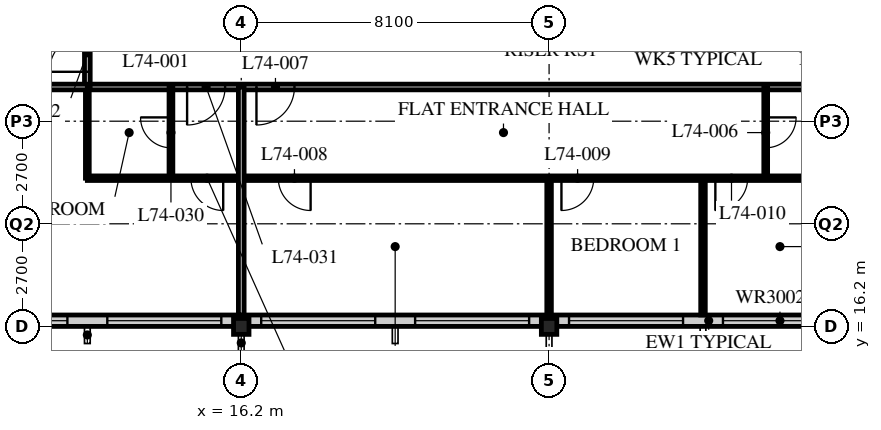
"""IFC4 building model, lengths in metres.
Left out: names, types, materials, properties, quantities, classifications, styles, units other than length and angle.
Written with IfcOpenShell. Run it as: python <this file> out.ifc"""

import sys

from ifc_helpers import new_model, si_unit, direction, frame, frame_2d, origin, origin_2d, place, context, subcontext, project, spatial, rectangle, i_section, extrude, element, fill, save


model = new_model("IFC4")
c1 = context("Model", 3, precision=1e-05, world=origin(), true_north=direction((0.0, 1.0)))
c2 = subcontext(c1, "Body", "Model", "MODEL_VIEW")
j1 = project(units=[si_unit("LENGTHUNIT", "METRE"), si_unit("PLANEANGLEUNIT", "RADIAN")], contexts=[c1])
p1 = place(None, origin())
s1 = spatial("IfcSite", under=j1, at=p1, CompositionType="ELEMENT")
p2 = place(p1, origin())
s2 = spatial("IfcBuilding", under=s1, at=p2, CompositionType="ELEMENT")
p3 = place(p2, frame((0.0, 0.0, 289.2)))
s3 = spatial("IfcBuildingStorey", under=s2, at=p3, CompositionType="ELEMENT", Elevation=289.2)
for number, where, z_axis, x_axis in (
    (1, (16.2, 16.2, 0.0), (0.0, 0.0, 1.0), (1.0, 0.0, 0.0)),
    (2, (24.3, 16.2, 0.0), (0.0, 0.0, 1.0), (1.0, 0.0, 0.0)),
):
    element("IfcColumn", number, at=place(p3, frame(where, z_axis=z_axis, x_axis=x_axis)), inside=s3, PredefinedType="COLUMN", context=c2, shape_type="SweptSolid", body=[
        extrude(i_section(OverallWidth=0.407, OverallDepth=0.419, WebThickness=0.031, FlangeThickness=0.049, FilletRadius=0.015, at=origin_2d()), origin(), (0.0, 0.0, 1.0), 3.9),
    ])
p4 = place(p3, frame((8.4, 16.35, 0.0), z_axis=(0.0, 0.0, 1.0), x_axis=(1.0, 0.0, 0.0)))
e3 = element("IfcWall", 3, at=p4, inside=s3, PredefinedType="SOLIDWALL", context=c2, shape_type="SweptSolid", body=[
    extrude(rectangle(XDim=40.2, YDim=0.3, at=frame_2d((20.1, 0.0))), origin(), (0.0, 0.0, 1.0), 3.69),
])
p5 = place(p4, frame((0.225, 0.0, 0.6)))
e4 = element("IfcOpeningElement", 4, at=p5, cuts=e3, PredefinedType="OPENING", context=c2, shape_type="SweptSolid", body=[
    extrude(rectangle(XDim=3.0, YDim=2.4, at=frame_2d((1.5, 1.2))), frame((0.0, 0.16, 0.0), z_axis=(0.0, -1.0, 0.0), x_axis=(1.0, 0.0, 0.0)), (0.0, 0.0, 1.0), 0.32),
])
p6 = place(p4, frame((4.275, 0.0, 0.6)))
e5 = element("IfcOpeningElement", 5, at=p6, cuts=e3, PredefinedType="OPENING", context=c2, shape_type="SweptSolid", body=[
    extrude(rectangle(XDim=3.0, YDim=2.4, at=frame_2d((1.5, 1.2))), frame((0.0, 0.16, 0.0), z_axis=(0.0, -1.0, 0.0), x_axis=(1.0, 0.0, 0.0)), (0.0, 0.0, 1.0), 0.32),
])
p7 = place(p4, frame((8.325, 0.0, 0.6)))
e6 = element("IfcOpeningElement", 6, at=p7, cuts=e3, PredefinedType="OPENING", context=c2, shape_type="SweptSolid", body=[
    extrude(rectangle(XDim=3.0, YDim=2.4, at=frame_2d((1.5, 1.2))), frame((0.0, 0.16, 0.0), z_axis=(0.0, -1.0, 0.0), x_axis=(1.0, 0.0, 0.0)), (0.0, 0.0, 1.0), 0.32),
])
p8 = place(p4, frame((12.375, 0.0, 0.6)))
e7 = element("IfcOpeningElement", 7, at=p8, cuts=e3, PredefinedType="OPENING", context=c2, shape_type="SweptSolid", body=[
    extrude(rectangle(XDim=3.0, YDim=2.4, at=frame_2d((1.5, 1.2))), frame((0.0, 0.16, 0.0), z_axis=(0.0, -1.0, 0.0), x_axis=(1.0, 0.0, 0.0)), (0.0, 0.0, 1.0), 0.32),
])
p9 = place(p4, frame((16.425, 0.0, 0.6)))
e8 = element("IfcOpeningElement", 8, at=p9, cuts=e3, PredefinedType="OPENING", context=c2, shape_type="SweptSolid", body=[
    extrude(rectangle(XDim=3.0, YDim=2.4, at=frame_2d((1.5, 1.2))), frame((0.0, 0.16, 0.0), z_axis=(0.0, -1.0, 0.0), x_axis=(1.0, 0.0, 0.0)), (0.0, 0.0, 1.0), 0.32),
])
p10 = place(p4, frame((20.475, 0.0, 0.6)))
e9 = element("IfcOpeningElement", 9, at=p10, cuts=e3, PredefinedType="OPENING", context=c2, shape_type="SweptSolid", body=[
    extrude(rectangle(XDim=3.0, YDim=2.4, at=frame_2d((1.5, 1.2))), frame((0.0, 0.16, 0.0), z_axis=(0.0, -1.0, 0.0), x_axis=(1.0, 0.0, 0.0)), (0.0, 0.0, 1.0), 0.32),
])
p11 = place(p4, frame((24.525, 0.0, 0.6)))
e10 = element("IfcOpeningElement", 10, at=p11, cuts=e3, PredefinedType="OPENING", context=c2, shape_type="SweptSolid", body=[
    extrude(rectangle(XDim=3.0, YDim=2.4, at=frame_2d((1.5, 1.2))), frame((0.0, 0.16, 0.0), z_axis=(0.0, -1.0, 0.0), x_axis=(1.0, 0.0, 0.0)), (0.0, 0.0, 1.0), 0.32),
])
p12 = place(p4, frame((28.575, 0.0, 0.6)))
e11 = element("IfcOpeningElement", 11, at=p12, cuts=e3, PredefinedType="OPENING", context=c2, shape_type="SweptSolid", body=[
    extrude(rectangle(XDim=3.0, YDim=2.4, at=frame_2d((1.5, 1.2))), frame((0.0, 0.16, 0.0), z_axis=(0.0, -1.0, 0.0), x_axis=(1.0, 0.0, 0.0)), (0.0, 0.0, 1.0), 0.32),
])
p13 = place(p4, frame((32.625, 0.0, 0.6)))
e12 = element("IfcOpeningElement", 12, at=p13, cuts=e3, PredefinedType="OPENING", context=c2, shape_type="SweptSolid", body=[
    extrude(rectangle(XDim=3.0, YDim=2.4, at=frame_2d((1.5, 1.2))), frame((0.0, 0.16, 0.0), z_axis=(0.0, -1.0, 0.0), x_axis=(1.0, 0.0, 0.0)), (0.0, 0.0, 1.0), 0.32),
])
p14 = place(p4, frame((36.675, 0.0, 0.6)))
e13 = element("IfcOpeningElement", 13, at=p14, cuts=e3, PredefinedType="OPENING", context=c2, shape_type="SweptSolid", body=[
    extrude(rectangle(XDim=3.0, YDim=2.4, at=frame_2d((1.5, 1.2))), frame((0.0, 0.16, 0.0), z_axis=(0.0, -1.0, 0.0), x_axis=(1.0, 0.0, 0.0)), (0.0, 0.0, 1.0), 0.32),
])
p15 = place(p3, frame((12.15, 22.5, 0.0), z_axis=(0.0, 0.0, 1.0), x_axis=(1.0, 0.0, 0.0)))
e14 = element("IfcWall", 14, at=p15, inside=s3, PredefinedType="PARTITIONING", context=c2, shape_type="SweptSolid", body=[
    extrude(rectangle(XDim=24.3, YDim=0.15, at=frame_2d((12.15, 0.0))), origin(), (0.0, 0.0, 1.0), 3.69),
])
p16 = place(p15, frame((4.45, 0.0, 0.0)))
e15 = element("IfcOpeningElement", 15, at=p16, cuts=e14, PredefinedType="OPENING", context=c2, shape_type="SweptSolid", body=[
    extrude(rectangle(XDim=1.0, YDim=2.1, at=frame_2d((0.5, 1.05))), frame((0.0, 0.085, 0.0), z_axis=(0.0, -1.0, 0.0), x_axis=(1.0, 0.0, 0.0)), (0.0, 0.0, 1.0), 0.17),
])
p17 = place(p15, frame((22.6, 0.0, 0.0)))
e16 = element("IfcOpeningElement", 16, at=p17, cuts=e14, PredefinedType="OPENING", context=c2, shape_type="SweptSolid", body=[
    extrude(rectangle(XDim=1.0, YDim=2.1, at=frame_2d((0.5, 1.05))), frame((0.0, 0.085, 0.0), z_axis=(0.0, -1.0, 0.0), x_axis=(1.0, 0.0, 0.0)), (0.0, 0.0, 1.0), 0.17),
])
p18 = place(p15, frame((2.625, 0.0, 0.0)))
e17 = element("IfcOpeningElement", 17, at=p18, cuts=e14, PredefinedType="OPENING", context=c2, shape_type="SweptSolid", body=[
    extrude(rectangle(XDim=1.0, YDim=2.1, at=frame_2d((0.5, 1.05))), frame((0.0, 0.085, 0.0), z_axis=(0.0, -1.0, 0.0), x_axis=(1.0, 0.0, 0.0)), (0.0, 0.0, 1.0), 0.17),
])
p19 = place(p3, frame((12.15, 22.5, 0.0), z_axis=(0.0, 0.0, 1.0), x_axis=(0.0, 1.0, 0.0)))
e18 = element("IfcWall", 18, at=p19, inside=s3, PredefinedType="PARTITIONING", context=c2, shape_type="SweptSolid", body=[
    extrude(rectangle(XDim=26.1, YDim=0.15, at=frame_2d((13.05, 0.0))), origin(), (0.0, 0.0, 1.0), 3.69),
])
p20 = place(p19, frame((0.4, 0.0, 0.0)))
e19 = element("IfcOpeningElement", 19, at=p20, cuts=e18, PredefinedType="OPENING", context=c2, shape_type="SweptSolid", body=[
    extrude(rectangle(XDim=1.0, YDim=2.1, at=frame_2d((0.5, 1.05))), frame((0.0, 0.085, 0.0), z_axis=(0.0, -1.0, 0.0), x_axis=(1.0, 0.0, 0.0)), (0.0, 0.0, 1.0), 0.17),
])
p21 = place(p3, frame((30.0, 22.5, 0.0), z_axis=(0.0, 0.0, 1.0), x_axis=(0.0, -1.0, 0.0)))
e20 = element("IfcWall", 20, at=p21, inside=s3, PredefinedType="PARTITIONING", context=c2, shape_type="SweptSolid", body=[
    extrude(rectangle(XDim=2.4, YDim=0.1, at=frame_2d((1.2, 0.0))), origin(), (0.0, 0.0, 1.0), 3.69),
])
p22 = place(p21, frame((0.8, 0.0, 0.0)))
e21 = element("IfcOpeningElement", 21, at=p22, cuts=e20, PredefinedType="OPENING", context=c2, shape_type="SweptSolid", body=[
    extrude(rectangle(XDim=0.8, YDim=2.1, at=frame_2d((0.4, 1.05))), frame((0.0, 0.06, 0.0), z_axis=(0.0, -1.0, 0.0), x_axis=(1.0, 0.0, 0.0)), (0.0, 0.0, 1.0), 0.12),
])
p23 = place(p3, frame((24.3, 20.1, 0.0), z_axis=(0.0, 0.0, 1.0), x_axis=(0.0, -1.0, 0.0)))
e22 = element("IfcWall", 22, at=p23, inside=s3, PredefinedType="PARTITIONING", context=c2, shape_type="SweptSolid", body=[
    extrude(rectangle(XDim=3.6, YDim=0.12, at=frame_2d((1.8, 0.0))), origin(), (0.0, 0.0, 1.0), 3.078),
])
p24 = place(p3, frame((28.35, 20.1, 0.0), z_axis=(0.0, 0.0, 1.0), x_axis=(0.0, -1.0, 0.0)))
e23 = element("IfcWall", 23, at=p24, inside=s3, PredefinedType="PARTITIONING", context=c2, shape_type="SweptSolid", body=[
    extrude(rectangle(XDim=3.6, YDim=0.12, at=frame_2d((1.8, 0.0))), origin(), (0.0, 0.0, 1.0), 3.69),
])
p25 = place(p3, frame((12.15, 20.1, 0.0), z_axis=(0.0, 0.0, 1.0), x_axis=(1.0, 0.0, 0.0)))
e24 = element("IfcWall", 24, at=p25, inside=s3, PredefinedType="PARTITIONING", context=c2, shape_type="SweptSolid", body=[
    extrude(rectangle(XDim=20.25, YDim=0.12, at=frame_2d((10.125, 0.0))), origin(), (0.0, 0.0, 1.0), 3.69),
])
p26 = place(p25, frame((5.025, 0.0, 0.0)))
e25 = element("IfcOpeningElement", 25, at=p26, cuts=e24, PredefinedType="OPENING", context=c2, shape_type="SweptSolid", body=[
    extrude(rectangle(XDim=0.85, YDim=2.1, at=frame_2d((0.425, 1.05))), frame((0.0, 0.07, 0.0), z_axis=(0.0, -1.0, 0.0), x_axis=(1.0, 0.0, 0.0)), (0.0, 0.0, 1.0), 0.14),
])
p27 = place(p25, frame((12.475, 0.0, 0.0)))
e26 = element("IfcOpeningElement", 26, at=p27, cuts=e24, PredefinedType="OPENING", context=c2, shape_type="SweptSolid", body=[
    extrude(rectangle(XDim=0.85, YDim=2.1, at=frame_2d((0.425, 1.05))), frame((0.0, 0.07, 0.0), z_axis=(0.0, -1.0, 0.0), x_axis=(1.0, 0.0, 0.0)), (0.0, 0.0, 1.0), 0.14),
])
p28 = place(p25, frame((16.525, 0.0, 0.0)))
e27 = element("IfcOpeningElement", 27, at=p28, cuts=e24, PredefinedType="OPENING", context=c2, shape_type="SweptSolid", body=[
    extrude(rectangle(XDim=0.85, YDim=2.1, at=frame_2d((0.425, 1.05))), frame((0.0, 0.07, 0.0), z_axis=(0.0, -1.0, 0.0), x_axis=(1.0, 0.0, 0.0)), (0.0, 0.0, 1.0), 0.14),
])
p29 = place(p25, frame((2.725, 0.0, 0.0)))
e28 = element("IfcOpeningElement", 28, at=p29, cuts=e24, PredefinedType="OPENING", context=c2, shape_type="SweptSolid", body=[
    extrude(rectangle(XDim=0.85, YDim=2.1, at=frame_2d((0.425, 1.05))), frame((0.0, 0.07, 0.0), z_axis=(0.0, -1.0, 0.0), x_axis=(1.0, 0.0, 0.0)), (0.0, 0.0, 1.0), 0.14),
])
p30 = place(p3, frame((14.35, 22.5, 0.0), z_axis=(0.0, 0.0, 1.0), x_axis=(0.0, -1.0, 0.0)))
e29 = element("IfcWall", 29, at=p30, inside=s3, PredefinedType="PARTITIONING", context=c2, shape_type="SweptSolid", body=[
    extrude(rectangle(XDim=2.4, YDim=0.1, at=frame_2d((1.2, 0.0))), origin(), (0.0, 0.0, 1.0), 3.69),
])
p31 = place(p30, frame((0.8, 0.0, 0.0)))
e30 = element("IfcOpeningElement", 30, at=p31, cuts=e29, PredefinedType="OPENING", context=c2, shape_type="SweptSolid", body=[
    extrude(rectangle(XDim=0.8, YDim=2.1, at=frame_2d((0.4, 1.05))), frame((0.0, 0.06, 0.0), z_axis=(0.0, -1.0, 0.0), x_axis=(1.0, 0.0, 0.0)), (0.0, 0.0, 1.0), 0.12),
])
p32 = place(p3, frame((12.15, 22.5, 0.0), z_axis=(0.0, 0.0, 1.0), x_axis=(0.0, -1.0, 0.0)))
e31 = element("IfcWall", 31, at=p32, inside=s3, PredefinedType="PARTITIONING", context=c2, shape_type="SweptSolid", body=[
    extrude(rectangle(XDim=2.4, YDim=0.1, at=frame_2d((1.2, 0.0))), origin(), (0.0, 0.0, 1.0), 3.69),
])
p33 = place(p3, frame((4.35, 22.5, 0.0), z_axis=(0.0, 0.0, 1.0), x_axis=(1.0, 0.0, 0.0)))
e32 = element("IfcWall", 32, at=p33, inside=s3, PredefinedType="PARTITIONING", context=c2, shape_type="SweptSolid", body=[
    extrude(rectangle(XDim=7.8, YDim=0.15, at=frame_2d((3.9, 0.0))), origin(), (0.0, 0.0, 1.0), 3.69),
])
p34 = place(p3, frame((16.2, 22.5, 0.0), z_axis=(0.0, 0.0, 1.0), x_axis=(0.0, -1.0, 0.0)))
e33 = element("IfcWall", 33, at=p34, inside=s3, PredefinedType="PARTITIONING", context=c2, shape_type="SweptSolid", body=[
    extrude(rectangle(XDim=6.0, YDim=0.15, at=frame_2d((3.0, 0.0))), origin(), (0.0, 0.0, 1.0), 3.078),
])
p35 = place(p5, origin())
e34 = element("IfcWindow", 34, at=p35, inside=s3, PartitioningType="SINGLE_PANEL", PredefinedType="WINDOW", context=c2, shape_type="SweptSolid", body=[
    extrude(rectangle(XDim=3.0, YDim=2.4, at=frame_2d((1.5, 1.2))), frame((0.0, 0.03, 0.0), z_axis=(0.0, -1.0, 0.0), x_axis=(1.0, 0.0, 0.0)), (0.0, 0.0, 1.0), 0.06),
])
fill(e4, e34)
p36 = place(p6, origin())
e35 = element("IfcWindow", 35, at=p36, inside=s3, PartitioningType="SINGLE_PANEL", PredefinedType="WINDOW", context=c2, shape_type="SweptSolid", body=[
    extrude(rectangle(XDim=3.0, YDim=2.4, at=frame_2d((1.5, 1.2))), frame((0.0, 0.03, 0.0), z_axis=(0.0, -1.0, 0.0), x_axis=(1.0, 0.0, 0.0)), (0.0, 0.0, 1.0), 0.06),
])
fill(e5, e35)
p37 = place(p7, origin())
e36 = element("IfcWindow", 36, at=p37, inside=s3, PartitioningType="SINGLE_PANEL", PredefinedType="WINDOW", context=c2, shape_type="SweptSolid", body=[
    extrude(rectangle(XDim=3.0, YDim=2.4, at=frame_2d((1.5, 1.2))), frame((0.0, 0.03, 0.0), z_axis=(0.0, -1.0, 0.0), x_axis=(1.0, 0.0, 0.0)), (0.0, 0.0, 1.0), 0.06),
])
fill(e6, e36)
p38 = place(p8, origin())
e37 = element("IfcWindow", 37, at=p38, inside=s3, PartitioningType="SINGLE_PANEL", PredefinedType="WINDOW", context=c2, shape_type="SweptSolid", body=[
    extrude(rectangle(XDim=3.0, YDim=2.4, at=frame_2d((1.5, 1.2))), frame((0.0, 0.03, 0.0), z_axis=(0.0, -1.0, 0.0), x_axis=(1.0, 0.0, 0.0)), (0.0, 0.0, 1.0), 0.06),
])
fill(e7, e37)
p39 = place(p9, origin())
e38 = element("IfcWindow", 38, at=p39, inside=s3, PartitioningType="SINGLE_PANEL", PredefinedType="WINDOW", context=c2, shape_type="SweptSolid", body=[
    extrude(rectangle(XDim=3.0, YDim=2.4, at=frame_2d((1.5, 1.2))), frame((0.0, 0.03, 0.0), z_axis=(0.0, -1.0, 0.0), x_axis=(1.0, 0.0, 0.0)), (0.0, 0.0, 1.0), 0.06),
])
fill(e8, e38)
p40 = place(p10, origin())
e39 = element("IfcWindow", 39, at=p40, inside=s3, PartitioningType="SINGLE_PANEL", PredefinedType="WINDOW", context=c2, shape_type="SweptSolid", body=[
    extrude(rectangle(XDim=3.0, YDim=2.4, at=frame_2d((1.5, 1.2))), frame((0.0, 0.03, 0.0), z_axis=(0.0, -1.0, 0.0), x_axis=(1.0, 0.0, 0.0)), (0.0, 0.0, 1.0), 0.06),
])
fill(e9, e39)
p41 = place(p22, origin())
e40 = element("IfcDoor", 40, at=p41, inside=s3, OperationType="SINGLE_SWING_LEFT", PredefinedType="DOOR", context=c2, shape_type="SweptSolid", body=[
    extrude(rectangle(XDim=0.8, YDim=2.1, at=frame_2d((0.4, 1.05))), frame((0.0, 0.025, 0.0), z_axis=(0.0, -1.0, 0.0), x_axis=(1.0, 0.0, 0.0)), (0.0, 0.0, 1.0), 0.05),
])
fill(e21, e40)
p42 = place(p16, origin())
e41 = element("IfcDoor", 41, at=p42, inside=s3, OperationType="SINGLE_SWING_RIGHT", PredefinedType="DOOR", context=c2, shape_type="SweptSolid", body=[
    extrude(rectangle(XDim=1.0, YDim=2.1, at=frame_2d((0.5, 1.05))), frame((0.0, 0.025, 0.0), z_axis=(0.0, -1.0, 0.0), x_axis=(1.0, 0.0, 0.0)), (0.0, 0.0, 1.0), 0.05),
])
fill(e15, e41)
p43 = place(p26, origin())
e42 = element("IfcDoor", 42, at=p43, inside=s3, OperationType="SINGLE_SWING_LEFT", PredefinedType="DOOR", context=c2, shape_type="SweptSolid", body=[
    extrude(rectangle(XDim=0.85, YDim=2.1, at=frame_2d((0.425, 1.05))), frame((0.0, 0.025, 0.0), z_axis=(0.0, -1.0, 0.0), x_axis=(1.0, 0.0, 0.0)), (0.0, 0.0, 1.0), 0.05),
])
fill(e25, e42)
p44 = place(p27, origin())
e43 = element("IfcDoor", 43, at=p44, inside=s3, OperationType="SINGLE_SWING_RIGHT", PredefinedType="DOOR", context=c2, shape_type="SweptSolid", body=[
    extrude(rectangle(XDim=0.85, YDim=2.1, at=frame_2d((0.425, 1.05))), frame((0.0, 0.025, 0.0), z_axis=(0.0, -1.0, 0.0), x_axis=(1.0, 0.0, 0.0)), (0.0, 0.0, 1.0), 0.05),
])
fill(e26, e43)
p45 = place(p28, origin())
e44 = element("IfcDoor", 44, at=p45, inside=s3, OperationType="SINGLE_SWING_RIGHT", PredefinedType="DOOR", context=c2, shape_type="SweptSolid", body=[
    extrude(rectangle(XDim=0.85, YDim=2.1, at=frame_2d((0.425, 1.05))), frame((0.0, 0.025, 0.0), z_axis=(0.0, -1.0, 0.0), x_axis=(1.0, 0.0, 0.0)), (0.0, 0.0, 1.0), 0.05),
])
fill(e27, e44)
p46 = place(p20, origin())
e45 = element("IfcDoor", 45, at=p46, inside=s3, OperationType="SINGLE_SWING_LEFT", PredefinedType="DOOR", context=c2, shape_type="SweptSolid", body=[
    extrude(rectangle(XDim=1.0, YDim=2.1, at=frame_2d((0.5, 1.05))), frame((0.0, 0.025, 0.0), z_axis=(0.0, -1.0, 0.0), x_axis=(1.0, 0.0, 0.0)), (0.0, 0.0, 1.0), 0.05),
])
fill(e19, e45)
p47 = place(p31, origin())
e46 = element("IfcDoor", 46, at=p47, inside=s3, OperationType="SINGLE_SWING_RIGHT", PredefinedType="DOOR", context=c2, shape_type="SweptSolid", body=[
    extrude(rectangle(XDim=0.8, YDim=2.1, at=frame_2d((0.4, 1.05))), frame((0.0, 0.025, 0.0), z_axis=(0.0, -1.0, 0.0), x_axis=(1.0, 0.0, 0.0)), (0.0, 0.0, 1.0), 0.05),
])
fill(e30, e46)
p48 = place(p18, origin())
e47 = element("IfcDoor", 47, at=p48, inside=s3, OperationType="SINGLE_SWING_RIGHT", PredefinedType="DOOR", context=c2, shape_type="SweptSolid", body=[
    extrude(rectangle(XDim=1.0, YDim=2.1, at=frame_2d((0.5, 1.05))), frame((0.0, 0.025, 0.0), z_axis=(0.0, -1.0, 0.0), x_axis=(1.0, 0.0, 0.0)), (0.0, 0.0, 1.0), 0.05),
])
fill(e17, e47)
p49 = place(p29, origin())
e48 = element("IfcDoor", 48, at=p49, inside=s3, OperationType="SINGLE_SWING_LEFT", PredefinedType="DOOR", context=c2, shape_type="SweptSolid", body=[
    extrude(rectangle(XDim=0.85, YDim=2.1, at=frame_2d((0.425, 1.05))), frame((0.0, 0.025, 0.0), z_axis=(0.0, -1.0, 0.0), x_axis=(1.0, 0.0, 0.0)), (0.0, 0.0, 1.0), 0.05),
])
fill(e28, e48)
save(model, sys.argv[1])
